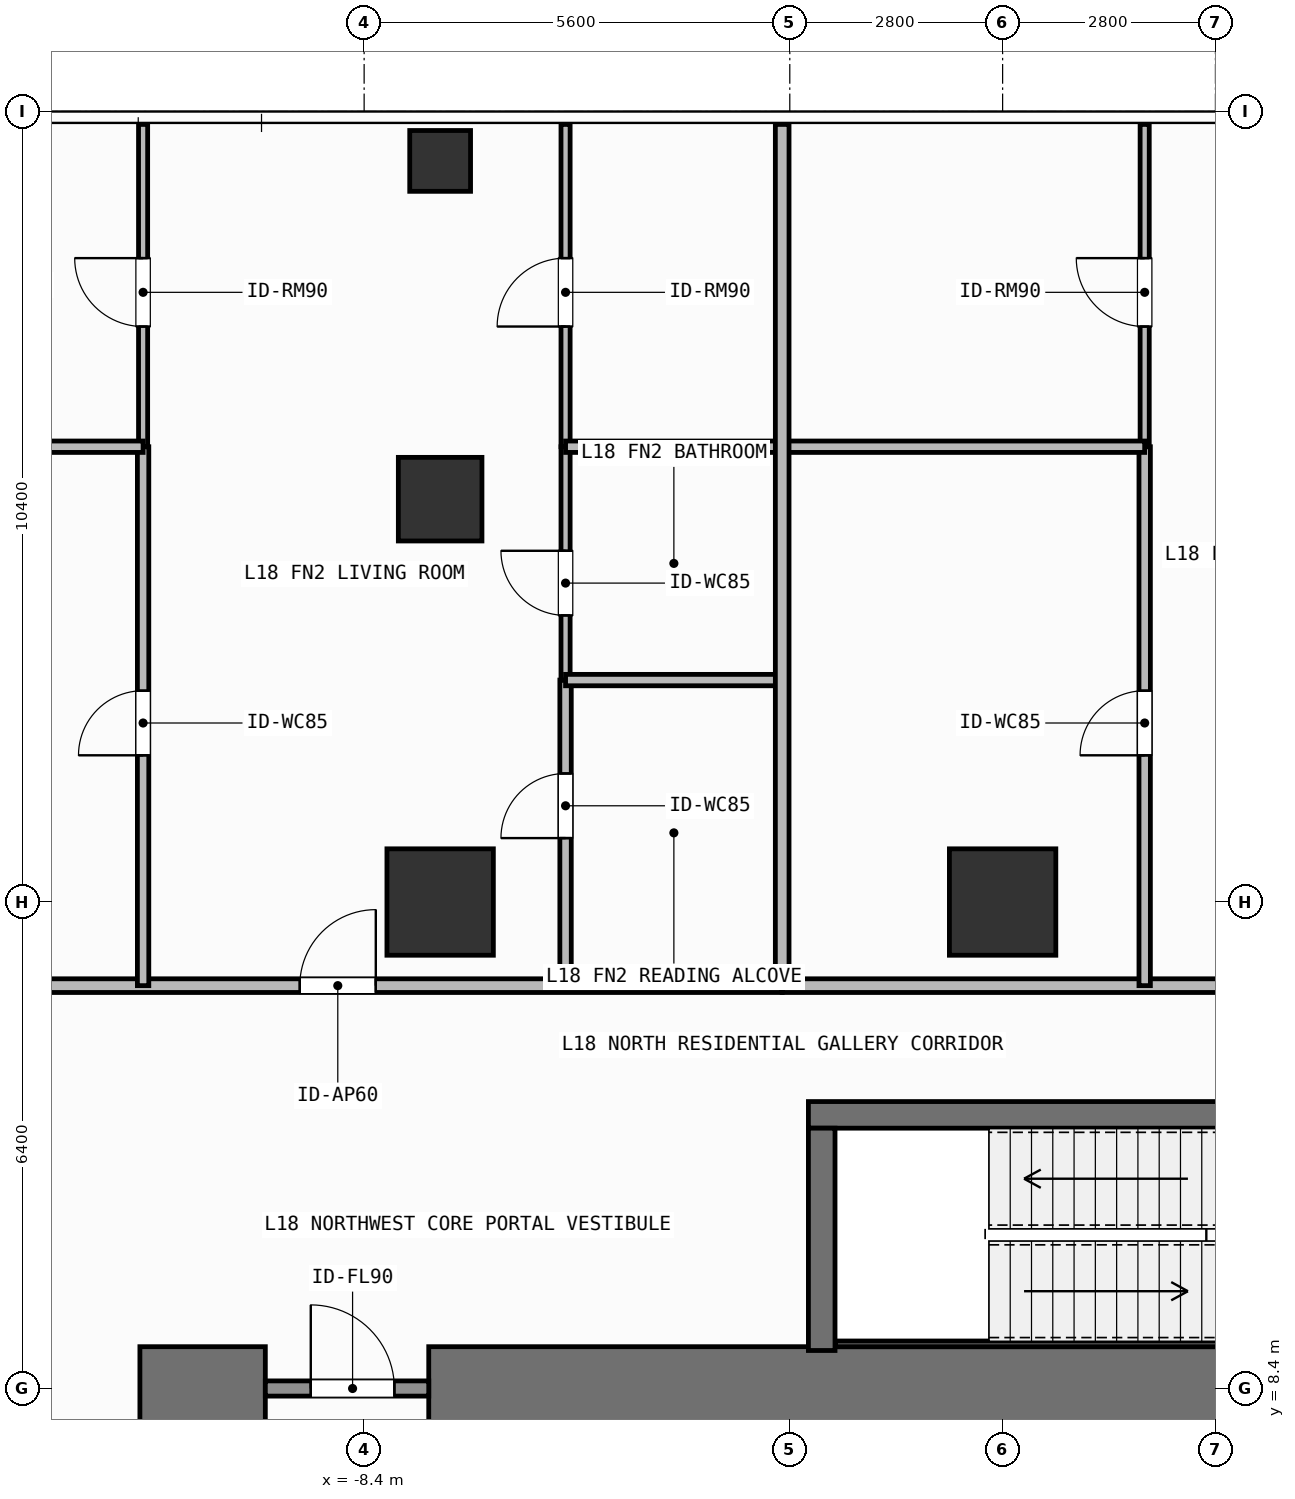
"""IFC4 building model, lengths in metres.
Left out: names, types, materials, properties, quantities, classifications, styles, units other than length and angle.
Written with IfcOpenShell. Run it as: python <this file> out.ifc"""

import sys

from ifc_helpers import new_model, si_unit, direction, frame, frame_2d, origin, origin_2d, place, context, subcontext, project, spatial, rectangle, hollow_rectangle, extrude, element, fill, save


model = new_model("IFC4")
c1 = context("Model", 3, precision=1e-05, world=origin(), true_north=direction((0.0, 1.0)))
c2 = subcontext(c1, "Body", "Model", "MODEL_VIEW")
j1 = project(units=[si_unit("LENGTHUNIT", "METRE"), si_unit("PLANEANGLEUNIT", "RADIAN")], contexts=[c1])
p1 = place(None, origin())
s1 = spatial("IfcSite", under=j1, at=p1, CompositionType="ELEMENT")
p2 = place(p1, origin())
s2 = spatial("IfcBuilding", under=s1, at=p2, CompositionType="ELEMENT")
p3 = place(p2, frame((0.0, 0.0, 69.6)))
s3 = spatial("IfcBuildingStorey", under=s2, at=p3, CompositionType="ELEMENT", Elevation=69.6)
p4 = place(p3, frame((-11.35, 8.4, 0.0), z_axis=(0.0, 0.0, 1.0), x_axis=(1.0, 0.0, 0.0)))
e1 = element("IfcWall", 1, at=p4, inside=s3, PredefinedType="SHEAR", context=c2, shape_type="SweptSolid", body=[
    extrude(rectangle(XDim=1.65, YDim=1.1, at=frame_2d((0.825, 0.0))), origin(), (0.0, 0.0, 1.0), 3.9),
])
p5 = place(p3, frame((-7.55, 8.4, 0.0), z_axis=(0.0, 0.0, 1.0), x_axis=(1.0, 0.0, 0.0)))
e2 = element("IfcWall", 2, at=p5, inside=s3, PredefinedType="SHEAR", context=c2, shape_type="SweptSolid", body=[
    extrude(rectangle(XDim=16.5, YDim=1.1, at=frame_2d((8.25, 0.0))), origin(), (0.0, 0.0, 1.0), 3.9),
])
p6 = place(p3, frame((-2.555, 12.0, 0.0), z_axis=(0.0, 0.0, 1.0), x_axis=(1.0, 0.0, 0.0)))
e3 = element("IfcWall", 3, at=p6, inside=s3, PredefinedType="SHEAR", context=c2, shape_type="SweptSolid", body=[
    extrude(rectangle(XDim=7.31, YDim=0.35, at=frame_2d((3.655, 0.0))), origin(), (0.0, 0.0, 1.0), 3.9),
])
p7 = place(p3, frame((-2.2, 8.988, 0.0), z_axis=(0.0, 0.0, 1.0), x_axis=(1.0, 0.0, 0.0)))
e4 = element("IfcWall", 4, at=p7, inside=s3, PredefinedType="SHEAR", context=c2, shape_type="SweptSolid", body=[
    extrude(rectangle(XDim=6.6, YDim=0.075, at=frame_2d((3.3, 0.0))), origin(), (0.0, 0.0, 1.0), 3.9),
])
p8 = place(p3, frame((-2.38, 8.9, 0.0), z_axis=(0.0, 0.0, 1.0), x_axis=(0.0, 1.0, 0.0)))
e5 = element("IfcWall", 5, at=p8, inside=s3, PredefinedType="SHEAR", context=c2, shape_type="SweptSolid", body=[
    extrude(rectangle(XDim=2.925, YDim=0.35, at=frame_2d((1.462, 0.0))), origin(), (0.0, 0.0, 1.0), 3.9),
])
for number, where, z_axis, x_axis in (
    (6, (-7.4, 14.8, 0.0), (0.0, 0.0, 1.0), (1.0, 0.0, 0.0)),
    (7, (0.0, 14.8, 0.0), (0.0, 0.0, 1.0), (1.0, 0.0, 0.0)),
):
    element("IfcColumn", number, at=place(p3, frame(where, z_axis=z_axis, x_axis=x_axis)), inside=s3, PredefinedType="COLUMN", context=c2, shape_type="SweptSolid", body=[
        extrude(rectangle(XDim=1.4, YDim=1.4, at=origin_2d()), origin(), (0.0, 0.0, 1.0), 3.9),
    ])
p9 = place(p3, frame((-7.4, 20.1, 0.0), z_axis=(0.0, 0.0, 1.0), x_axis=(1.0, 0.0, 0.0)))
e8 = element("IfcColumn", 8, at=p9, inside=s3, PredefinedType="COLUMN", context=c2, shape_type="SweptSolid", body=[
    extrude(rectangle(XDim=1.1, YDim=1.1, at=origin_2d()), origin(), (0.0, 0.0, 1.0), 3.9),
])
p10 = place(p3, frame((-7.4, 24.55, 0.0), z_axis=(0.0, 0.0, 1.0), x_axis=(1.0, 0.0, 0.0)))
e9 = element("IfcColumn", 9, at=p10, inside=s3, PredefinedType="COLUMN", context=c2, shape_type="SweptSolid", body=[
    extrude(hollow_rectangle(XDim=0.8, YDim=0.8, WallThickness=0.036, at=origin_2d()), origin(), (0.0, 0.0, 1.0), 3.9),
])
p11 = place(p3, frame((-9.7, 8.4, 0.0), z_axis=(0.0, 0.0, 1.0), x_axis=(1.0, 0.0, 0.0)))
e10 = element("IfcWall", 10, at=p11, inside=s3, PredefinedType="SOLIDWALL", context=c2, shape_type="SweptSolid", body=[
    extrude(rectangle(XDim=2.15, YDim=0.2, at=frame_2d((1.075, 0.0))), origin(), (0.0, 0.0, 1.0), 2.72),
])
p12 = place(p11, frame((0.598, 0.0, 0.0)))
e11 = element("IfcOpeningElement", 11, at=p12, cuts=e10, PredefinedType="OPENING", context=c2, shape_type="SweptSolid", body=[
    extrude(rectangle(XDim=1.1, YDim=2.15, at=frame_2d((0.55, 1.075))), frame((0.0, 0.11, 0.0), z_axis=(0.0, -1.0, 0.0), x_axis=(1.0, 0.0, 0.0)), (0.0, 0.0, 1.0), 0.22),
])
p13 = place(p3, frame((-14.951, 13.7, 0.0), z_axis=(0.0, 0.0, 1.0), x_axis=(1.0, 0.0, 0.0)))
e12 = element("IfcWall", 12, at=p13, inside=s3, PredefinedType="PARTITIONING", context=c2, shape_type="SweptSolid", body=[
    extrude(rectangle(XDim=12.051, YDim=0.18, at=frame_2d((6.025, 0.0))), origin(), (0.0, 0.0, 1.0), 3.68),
])
p14 = place(p13, frame((5.704, 0.0, 0.0)))
e13 = element("IfcOpeningElement", 13, at=p14, cuts=e12, PredefinedType="OPENING", context=c2, shape_type="SweptSolid", body=[
    extrude(rectangle(XDim=1.0, YDim=2.2, at=frame_2d((0.5, 1.1))), frame((0.0, 0.1, 0.0), z_axis=(0.0, -1.0, 0.0), x_axis=(1.0, 0.0, 0.0)), (0.0, 0.0, 1.0), 0.2),
])
p15 = place(p3, frame((-11.308, 13.7, 0.0), z_axis=(0.0, 0.0, 1.0), x_axis=(0.0, 1.0, 0.0)))
e14 = element("IfcWall", 14, at=p15, inside=s3, PredefinedType="PARTITIONING", context=c2, shape_type="SweptSolid", body=[
    extrude(rectangle(XDim=7.09, YDim=0.15, at=frame_2d((3.545, 0.0))), origin(), (0.0, 0.0, 1.0), 3.37),
])
p16 = place(p15, frame((3.03, 0.0, 0.0)))
e15 = element("IfcOpeningElement", 15, at=p16, cuts=e14, PredefinedType="OPENING", context=c2, shape_type="SweptSolid", body=[
    extrude(rectangle(XDim=0.85, YDim=2.1, at=frame_2d((0.425, 1.05))), frame((0.0, 0.085, 0.0), z_axis=(0.0, -1.0, 0.0), x_axis=(1.0, 0.0, 0.0)), (0.0, 0.0, 1.0), 0.17),
])
p17 = place(p3, frame((-11.308, 20.79, 0.0), z_axis=(0.0, 0.0, 1.0), x_axis=(0.0, 1.0, 0.0)))
e16 = element("IfcWall", 16, at=p17, inside=s3, PredefinedType="PARTITIONING", context=c2, shape_type="SweptSolid", body=[
    extrude(rectangle(XDim=4.24, YDim=0.12, at=frame_2d((2.12, 0.0))), origin(), (0.0, 0.0, 1.0), 3.37),
])
p18 = place(p17, frame((1.581, 0.0, 0.0)))
e17 = element("IfcOpeningElement", 17, at=p18, cuts=e16, PredefinedType="OPENING", context=c2, shape_type="SweptSolid", body=[
    extrude(rectangle(XDim=0.9, YDim=2.1, at=frame_2d((0.45, 1.05))), frame((0.0, 0.07, 0.0), z_axis=(0.0, -1.0, 0.0), x_axis=(1.0, 0.0, 0.0)), (0.0, 0.0, 1.0), 0.14),
])
p19 = place(p3, frame((-5.75, 13.7, 0.0), z_axis=(0.0, 0.0, 1.0), x_axis=(0.0, 1.0, 0.0)))
e18 = element("IfcWall", 18, at=p19, inside=s3, PredefinedType="PARTITIONING", context=c2, shape_type="SweptSolid", body=[
    extrude(rectangle(XDim=4.02, YDim=0.15, at=frame_2d((2.01, 0.0))), origin(), (0.0, 0.0, 1.0), 3.68),
])
p20 = place(p19, frame((1.941, 0.0, 0.0)))
e19 = element("IfcOpeningElement", 19, at=p20, cuts=e18, PredefinedType="OPENING", context=c2, shape_type="SweptSolid", body=[
    extrude(rectangle(XDim=0.85, YDim=2.1, at=frame_2d((0.425, 1.05))), frame((0.0, 0.085, 0.0), z_axis=(0.0, -1.0, 0.0), x_axis=(1.0, 0.0, 0.0)), (0.0, 0.0, 1.0), 0.17),
])
p21 = place(p3, frame((-5.75, 17.72, 0.0), z_axis=(0.0, 0.0, 1.0), x_axis=(0.0, 1.0, 0.0)))
e20 = element("IfcWall", 20, at=p21, inside=s3, PredefinedType="PARTITIONING", context=c2, shape_type="SweptSolid", body=[
    extrude(rectangle(XDim=3.07, YDim=0.12, at=frame_2d((1.535, 0.0))), origin(), (0.0, 0.0, 1.0), 3.68),
])
p22 = place(p21, frame((0.851, 0.0, 0.0)))
e21 = element("IfcOpeningElement", 21, at=p22, cuts=e20, PredefinedType="OPENING", context=c2, shape_type="SweptSolid", body=[
    extrude(rectangle(XDim=0.85, YDim=2.1, at=frame_2d((0.425, 1.05))), frame((0.0, 0.07, 0.0), z_axis=(0.0, -1.0, 0.0), x_axis=(1.0, 0.0, 0.0)), (0.0, 0.0, 1.0), 0.14),
])
p23 = place(p3, frame((-5.75, 20.79, 0.0), z_axis=(0.0, 0.0, 1.0), x_axis=(0.0, 1.0, 0.0)))
e22 = element("IfcWall", 22, at=p23, inside=s3, PredefinedType="PARTITIONING", context=c2, shape_type="SweptSolid", body=[
    extrude(rectangle(XDim=4.24, YDim=0.12, at=frame_2d((2.12, 0.0))), origin(), (0.0, 0.0, 1.0), 3.68),
])
p24 = place(p23, frame((1.581, 0.0, 0.0)))
e23 = element("IfcOpeningElement", 23, at=p24, cuts=e22, PredefinedType="OPENING", context=c2, shape_type="SweptSolid", body=[
    extrude(rectangle(XDim=0.9, YDim=2.1, at=frame_2d((0.45, 1.05))), frame((0.0, 0.07, 0.0), z_axis=(0.0, -1.0, 0.0), x_axis=(1.0, 0.0, 0.0)), (0.0, 0.0, 1.0), 0.14),
])
p25 = place(p3, frame((-2.9, 13.7, 0.0), z_axis=(0.0, 0.0, 1.0), x_axis=(1.0, 0.0, 0.0)))
e24 = element("IfcWall", 24, at=p25, inside=s3, PredefinedType="PARTITIONING", context=c2, shape_type="SweptSolid", body=[
    extrude(rectangle(XDim=11.922, YDim=0.18, at=frame_2d((5.961, 0.0))), origin(), (0.0, 0.0, 1.0), 3.68),
])
p26 = place(p25, frame((5.91, 0.0, 0.0)))
e25 = element("IfcOpeningElement", 25, at=p26, cuts=e24, PredefinedType="OPENING", context=c2, shape_type="SweptSolid", body=[
    extrude(rectangle(XDim=1.0, YDim=2.2, at=frame_2d((0.5, 1.1))), frame((0.0, 0.1, 0.0), z_axis=(0.0, -1.0, 0.0), x_axis=(1.0, 0.0, 0.0)), (0.0, 0.0, 1.0), 0.2),
])
p27 = place(p3, frame((1.869, 13.7, 0.0), z_axis=(0.0, 0.0, 1.0), x_axis=(0.0, 1.0, 0.0)))
e26 = element("IfcWall", 26, at=p27, inside=s3, PredefinedType="PARTITIONING", context=c2, shape_type="SweptSolid", body=[
    extrude(rectangle(XDim=7.09, YDim=0.15, at=frame_2d((3.545, 0.0))), origin(), (0.0, 0.0, 1.0), 3.68),
])
p28 = place(p27, frame((3.03, 0.0, 0.0)))
e27 = element("IfcOpeningElement", 27, at=p28, cuts=e26, PredefinedType="OPENING", context=c2, shape_type="SweptSolid", body=[
    extrude(rectangle(XDim=0.85, YDim=2.1, at=frame_2d((0.425, 1.05))), frame((0.0, 0.085, 0.0), z_axis=(0.0, -1.0, 0.0), x_axis=(1.0, 0.0, 0.0)), (0.0, 0.0, 1.0), 0.17),
])
p29 = place(p3, frame((1.869, 20.79, 0.0), z_axis=(0.0, 0.0, 1.0), x_axis=(0.0, 1.0, 0.0)))
e28 = element("IfcWall", 28, at=p29, inside=s3, PredefinedType="PARTITIONING", context=c2, shape_type="SweptSolid", body=[
    extrude(rectangle(XDim=4.24, YDim=0.12, at=frame_2d((2.12, 0.0))), origin(), (0.0, 0.0, 1.0), 3.68),
])
p30 = place(p29, frame((1.581, 0.0, 0.0)))
e29 = element("IfcOpeningElement", 29, at=p30, cuts=e28, PredefinedType="OPENING", context=c2, shape_type="SweptSolid", body=[
    extrude(rectangle(XDim=0.9, YDim=2.1, at=frame_2d((0.45, 1.05))), frame((0.0, 0.07, 0.0), z_axis=(0.0, -1.0, 0.0), x_axis=(1.0, 0.0, 0.0)), (0.0, 0.0, 1.0), 0.14),
])
p31 = place(p3, frame((-14.951, 20.79, 0.0), z_axis=(0.0, 0.0, 1.0), x_axis=(1.0, 0.0, 0.0)))
e30 = element("IfcWall", 30, at=p31, inside=s3, PredefinedType="PARTITIONING", context=c2, shape_type="SweptSolid", body=[
    extrude(rectangle(XDim=3.643, YDim=0.15, at=frame_2d((1.821, 0.0))), origin(), (0.0, 0.0, 1.0), 3.68),
])
for number, where, z_axis, x_axis in (
    (31, (-5.75, 17.72, 0.0), (0.0, 0.0, 1.0), (1.0, 0.0, 0.0)),
    (32, (-5.75, 20.79, 0.0), (0.0, 0.0, 1.0), (1.0, 0.0, 0.0)),
):
    element("IfcWall", number, at=place(p3, frame(where, z_axis=z_axis, x_axis=x_axis)), inside=s3, PredefinedType="PARTITIONING", context=c2, shape_type="SweptSolid", body=[
        extrude(rectangle(XDim=2.85, YDim=0.15, at=frame_2d((1.425, 0.0))), origin(), (0.0, 0.0, 1.0), 3.68),
    ])
p32 = place(p3, frame((-2.9, 20.79, 0.0), z_axis=(0.0, 0.0, 1.0), x_axis=(1.0, 0.0, 0.0)))
e33 = element("IfcWall", 33, at=p32, inside=s3, PredefinedType="PARTITIONING", context=c2, shape_type="SweptSolid", body=[
    extrude(rectangle(XDim=4.769, YDim=0.15, at=frame_2d((2.384, 0.0))), origin(), (0.0, 0.0, 1.0), 3.68),
])
p33 = place(p3, frame((-2.9, 13.7, 0.0), z_axis=(0.0, 0.0, 1.0), x_axis=(0.0, 1.0, 0.0)))
e34 = element("IfcWall", 34, at=p33, inside=s3, PredefinedType="PARTITIONING", context=c2, shape_type="SweptSolid", body=[
    extrude(rectangle(XDim=11.33, YDim=0.18, at=frame_2d((5.665, 0.0))), origin(), (0.0, 0.0, 1.0), 3.68),
])
p34 = place(p12, origin())
e35 = element("IfcDoor", 35, at=p34, inside=s3, OperationType="SINGLE_SWING_LEFT", PredefinedType="DOOR", context=c2, shape_type="SweptSolid", body=[
    extrude(rectangle(XDim=1.1, YDim=2.15, at=frame_2d((0.55, 1.075))), frame((0.0, 0.025, 0.0), z_axis=(0.0, -1.0, 0.0), x_axis=(1.0, 0.0, 0.0)), (0.0, 0.0, 1.0), 0.05),
])
fill(e11, e35)
p35 = place(p14, origin())
e36 = element("IfcDoor", 36, at=p35, inside=s3, OperationType="SINGLE_SWING_RIGHT", PredefinedType="DOOR", context=c2, shape_type="SweptSolid", body=[
    extrude(rectangle(XDim=1.0, YDim=2.2, at=frame_2d((0.5, 1.1))), frame((0.0, 0.025, 0.0), z_axis=(0.0, -1.0, 0.0), x_axis=(1.0, 0.0, 0.0)), (0.0, 0.0, 1.0), 0.05),
])
fill(e13, e36)
p36 = place(p16, origin())
e37 = element("IfcDoor", 37, at=p36, inside=s3, OperationType="SINGLE_SWING_LEFT", PredefinedType="DOOR", context=c2, shape_type="SweptSolid", body=[
    extrude(rectangle(XDim=0.85, YDim=2.1, at=frame_2d((0.425, 1.05))), frame((0.0, 0.025, 0.0), z_axis=(0.0, -1.0, 0.0), x_axis=(1.0, 0.0, 0.0)), (0.0, 0.0, 1.0), 0.05),
])
fill(e15, e37)
p37 = place(p18, origin())
e38 = element("IfcDoor", 38, at=p37, inside=s3, OperationType="SINGLE_SWING_RIGHT", PredefinedType="DOOR", context=c2, shape_type="SweptSolid", body=[
    extrude(rectangle(XDim=0.9, YDim=2.1, at=frame_2d((0.45, 1.05))), frame((0.0, 0.025, 0.0), z_axis=(0.0, -1.0, 0.0), x_axis=(1.0, 0.0, 0.0)), (0.0, 0.0, 1.0), 0.05),
])
fill(e17, e38)
p38 = place(p20, origin())
e39 = element("IfcDoor", 39, at=p38, inside=s3, OperationType="SINGLE_SWING_LEFT", PredefinedType="DOOR", context=c2, shape_type="SweptSolid", body=[
    extrude(rectangle(XDim=0.85, YDim=2.1, at=frame_2d((0.425, 1.05))), frame((0.0, 0.025, 0.0), z_axis=(0.0, -1.0, 0.0), x_axis=(1.0, 0.0, 0.0)), (0.0, 0.0, 1.0), 0.05),
])
fill(e19, e39)
p39 = place(p22, origin())
e40 = element("IfcDoor", 40, at=p39, inside=s3, OperationType="SINGLE_SWING_RIGHT", PredefinedType="DOOR", context=c2, shape_type="SweptSolid", body=[
    extrude(rectangle(XDim=0.85, YDim=2.1, at=frame_2d((0.425, 1.05))), frame((0.0, 0.025, 0.0), z_axis=(0.0, -1.0, 0.0), x_axis=(1.0, 0.0, 0.0)), (0.0, 0.0, 1.0), 0.05),
])
fill(e21, e40)
p40 = place(p24, origin())
e41 = element("IfcDoor", 41, at=p40, inside=s3, OperationType="SINGLE_SWING_LEFT", PredefinedType="DOOR", context=c2, shape_type="SweptSolid", body=[
    extrude(rectangle(XDim=0.9, YDim=2.1, at=frame_2d((0.45, 1.05))), frame((0.0, 0.025, 0.0), z_axis=(0.0, -1.0, 0.0), x_axis=(1.0, 0.0, 0.0)), (0.0, 0.0, 1.0), 0.05),
])
fill(e23, e41)
p41 = place(p28, origin())
e42 = element("IfcDoor", 42, at=p41, inside=s3, OperationType="SINGLE_SWING_LEFT", PredefinedType="DOOR", context=c2, shape_type="SweptSolid", body=[
    extrude(rectangle(XDim=0.85, YDim=2.1, at=frame_2d((0.425, 1.05))), frame((0.0, 0.025, 0.0), z_axis=(0.0, -1.0, 0.0), x_axis=(1.0, 0.0, 0.0)), (0.0, 0.0, 1.0), 0.05),
])
fill(e27, e42)
p42 = place(p30, origin())
e43 = element("IfcDoor", 43, at=p42, inside=s3, OperationType="SINGLE_SWING_RIGHT", PredefinedType="DOOR", context=c2, shape_type="SweptSolid", body=[
    extrude(rectangle(XDim=0.9, YDim=2.1, at=frame_2d((0.45, 1.05))), frame((0.0, 0.025, 0.0), z_axis=(0.0, -1.0, 0.0), x_axis=(1.0, 0.0, 0.0)), (0.0, 0.0, 1.0), 0.05),
])
fill(e29, e43)
save(model, sys.argv[1])
